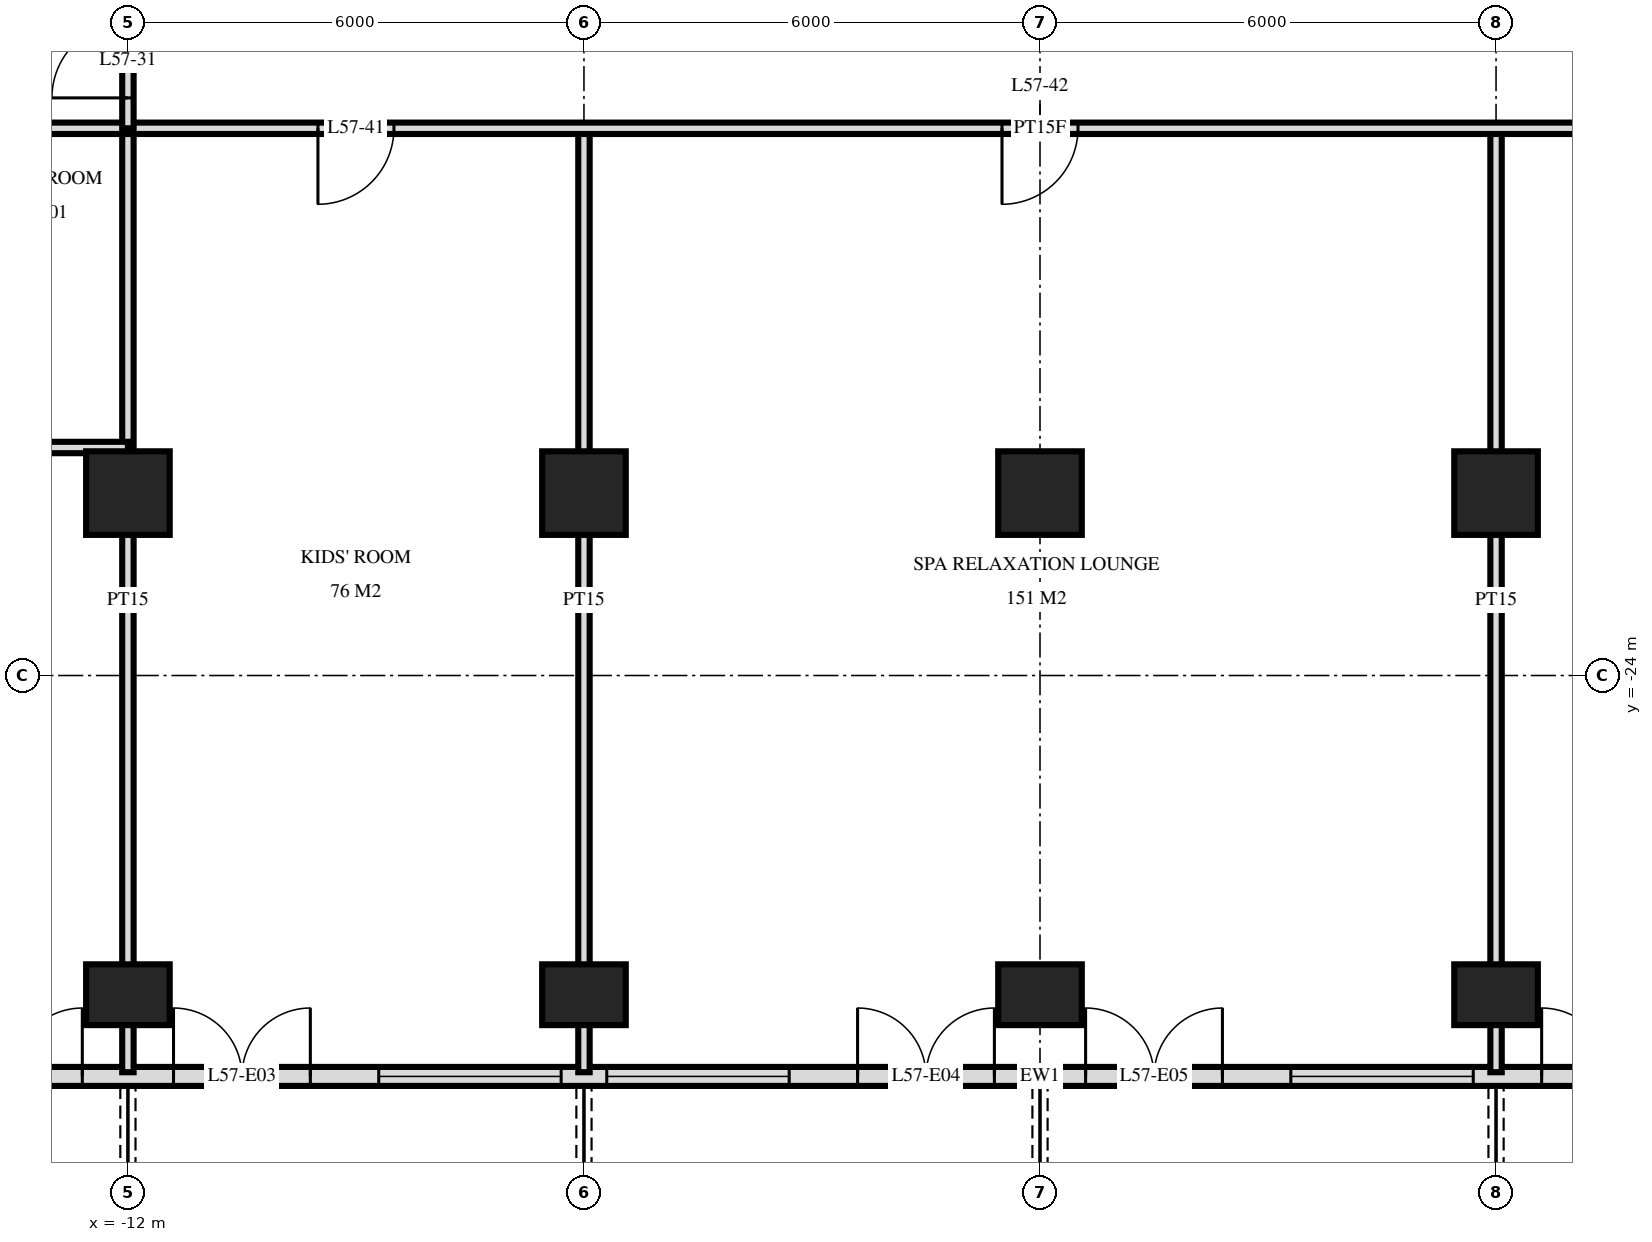
"""IFC4 building model, lengths in metres.
Left out: names, types, materials, properties, quantities, classifications, styles, units other than length and angle.
Written with IfcOpenShell. Run it as: python <this file> out.ifc"""

import sys

from ifc_helpers import new_model, si_unit, direction, frame, frame_2d, origin, origin_2d, place, context, subcontext, project, spatial, rectangle, extrude, element, fill, save


model = new_model("IFC4")
c1 = context("Model", 3, precision=1e-05, world=origin(), true_north=direction((0.0, 1.0)))
c2 = subcontext(c1, "Body", "Model", "MODEL_VIEW")
j1 = project(units=[si_unit("LENGTHUNIT", "METRE"), si_unit("PLANEANGLEUNIT", "RADIAN")], contexts=[c1])
p1 = place(None, origin())
s1 = spatial("IfcSite", under=j1, at=p1, CompositionType="ELEMENT")
p2 = place(p1, origin())
s2 = spatial("IfcBuilding", under=s1, at=p2, CompositionType="ELEMENT")
p3 = place(p2, frame((0.0, 0.0, 218.6)))
s3 = spatial("IfcBuildingStorey", under=s2, at=p3, CompositionType="ELEMENT", Elevation=218.6)
p4 = place(p3, frame((-12.0, -28.2, 0.0), z_axis=(0.0, 0.0, 1.0), x_axis=(1.0, 0.0, 0.0)))
e1 = element("IfcColumn", 1, at=p4, inside=s3, PredefinedType="COLUMN", context=c2, shape_type="SweptSolid", body=[
    extrude(rectangle(XDim=1.1, YDim=0.8, at=origin_2d()), origin(), (0.0, 0.0, 1.0), 3.5),
])
p5 = place(p3, frame((-12.0, -21.6, 0.0), z_axis=(0.0, 0.0, 1.0), x_axis=(1.0, 0.0, 0.0)))
e2 = element("IfcColumn", 2, at=p5, inside=s3, PredefinedType="COLUMN", context=c2, shape_type="SweptSolid", body=[
    extrude(rectangle(XDim=1.1, YDim=1.1, at=origin_2d()), origin(), (0.0, 0.0, 1.0), 3.5),
])
p6 = place(p3, frame((-6.0, -28.2, 0.0), z_axis=(0.0, 0.0, 1.0), x_axis=(1.0, 0.0, 0.0)))
e3 = element("IfcColumn", 3, at=p6, inside=s3, PredefinedType="COLUMN", context=c2, shape_type="SweptSolid", body=[
    extrude(rectangle(XDim=1.1, YDim=0.8, at=origin_2d()), origin(), (0.0, 0.0, 1.0), 3.5),
])
p7 = place(p3, frame((-6.0, -21.6, 0.0), z_axis=(0.0, 0.0, 1.0), x_axis=(1.0, 0.0, 0.0)))
e4 = element("IfcColumn", 4, at=p7, inside=s3, PredefinedType="COLUMN", context=c2, shape_type="SweptSolid", body=[
    extrude(rectangle(XDim=1.1, YDim=1.1, at=origin_2d()), origin(), (0.0, 0.0, 1.0), 3.5),
])
p8 = place(p3, frame((0.0, -28.2, 0.0), z_axis=(0.0, 0.0, 1.0), x_axis=(1.0, 0.0, 0.0)))
e5 = element("IfcColumn", 5, at=p8, inside=s3, PredefinedType="COLUMN", context=c2, shape_type="SweptSolid", body=[
    extrude(rectangle(XDim=1.1, YDim=0.8, at=origin_2d()), origin(), (0.0, 0.0, 1.0), 3.5),
])
p9 = place(p3, frame((0.0, -21.6, 0.0), z_axis=(0.0, 0.0, 1.0), x_axis=(1.0, 0.0, 0.0)))
e6 = element("IfcColumn", 6, at=p9, inside=s3, PredefinedType="COLUMN", context=c2, shape_type="SweptSolid", body=[
    extrude(rectangle(XDim=1.1, YDim=1.1, at=origin_2d()), origin(), (0.0, 0.0, 1.0), 3.5),
])
p10 = place(p3, frame((6.0, -28.2, 0.0), z_axis=(0.0, 0.0, 1.0), x_axis=(1.0, 0.0, 0.0)))
e7 = element("IfcColumn", 7, at=p10, inside=s3, PredefinedType="COLUMN", context=c2, shape_type="SweptSolid", body=[
    extrude(rectangle(XDim=1.1, YDim=0.8, at=origin_2d()), origin(), (0.0, 0.0, 1.0), 3.5),
])
p11 = place(p3, frame((6.0, -21.6, 0.0), z_axis=(0.0, 0.0, 1.0), x_axis=(1.0, 0.0, 0.0)))
e8 = element("IfcColumn", 8, at=p11, inside=s3, PredefinedType="COLUMN", context=c2, shape_type="SweptSolid", body=[
    extrude(rectangle(XDim=1.1, YDim=1.1, at=origin_2d()), origin(), (0.0, 0.0, 1.0), 3.5),
])
p12 = place(p3, frame((-22.475, -29.275, 0.0), z_axis=(0.0, 0.0, 1.0), x_axis=(1.0, 0.0, 0.0)))
e9 = element("IfcWall", 9, at=p12, inside=s3, PredefinedType="SOLIDWALL", context=c2, shape_type="SweptSolid", body=[
    extrude(rectangle(XDim=44.951, YDim=0.25, at=frame_2d((22.475, 0.0))), origin(), (0.0, 0.0, 1.0), 3.22),
])
p13 = place(p12, frame((0.575, 0.0, 0.0)))
e10 = element("IfcOpeningElement", 10, at=p13, cuts=e9, PredefinedType="OPENING", context=c2, shape_type="SweptSolid", body=[
    extrude(rectangle(XDim=1.8, YDim=2.4, at=frame_2d((0.9, 1.2))), frame((0.0, 0.135, 0.0), z_axis=(0.0, -1.0, 0.0), x_axis=(1.0, 0.0, 0.0)), (0.0, 0.0, 1.0), 0.27),
])
p14 = place(p12, frame((4.775, 0.0, 0.9)))
e11 = element("IfcOpeningElement", 11, at=p14, cuts=e9, PredefinedType="OPENING", context=c2, shape_type="SweptSolid", body=[
    extrude(rectangle(XDim=2.4, YDim=1.5, at=frame_2d((1.2, 0.75))), frame((0.0, 0.135, 0.0), z_axis=(0.0, -1.0, 0.0), x_axis=(1.0, 0.0, 0.0)), (0.0, 0.0, 1.0), 0.27),
])
p15 = place(p12, frame((8.075, 0.0, 0.0)))
e12 = element("IfcOpeningElement", 12, at=p15, cuts=e9, PredefinedType="OPENING", context=c2, shape_type="SweptSolid", body=[
    extrude(rectangle(XDim=1.8, YDim=2.4, at=frame_2d((0.9, 1.2))), frame((0.0, 0.135, 0.0), z_axis=(0.0, -1.0, 0.0), x_axis=(1.0, 0.0, 0.0)), (0.0, 0.0, 1.0), 0.27),
])
p16 = place(p12, frame((11.075, 0.0, 0.0)))
e13 = element("IfcOpeningElement", 13, at=p16, cuts=e9, PredefinedType="OPENING", context=c2, shape_type="SweptSolid", body=[
    extrude(rectangle(XDim=1.8, YDim=2.4, at=frame_2d((0.9, 1.2))), frame((0.0, 0.135, 0.0), z_axis=(0.0, -1.0, 0.0), x_axis=(1.0, 0.0, 0.0)), (0.0, 0.0, 1.0), 0.27),
])
p17 = place(p12, frame((13.775, 0.0, 0.9)))
e14 = element("IfcOpeningElement", 14, at=p17, cuts=e9, PredefinedType="OPENING", context=c2, shape_type="SweptSolid", body=[
    extrude(rectangle(XDim=2.4, YDim=1.5, at=frame_2d((1.2, 0.75))), frame((0.0, 0.135, 0.0), z_axis=(0.0, -1.0, 0.0), x_axis=(1.0, 0.0, 0.0)), (0.0, 0.0, 1.0), 0.27),
])
p18 = place(p12, frame((16.775, 0.0, 0.9)))
e15 = element("IfcOpeningElement", 15, at=p18, cuts=e9, PredefinedType="OPENING", context=c2, shape_type="SweptSolid", body=[
    extrude(rectangle(XDim=2.4, YDim=1.5, at=frame_2d((1.2, 0.75))), frame((0.0, 0.135, 0.0), z_axis=(0.0, -1.0, 0.0), x_axis=(1.0, 0.0, 0.0)), (0.0, 0.0, 1.0), 0.27),
])
p19 = place(p12, frame((20.075, 0.0, 0.0)))
e16 = element("IfcOpeningElement", 16, at=p19, cuts=e9, PredefinedType="OPENING", context=c2, shape_type="SweptSolid", body=[
    extrude(rectangle(XDim=1.8, YDim=2.4, at=frame_2d((0.9, 1.2))), frame((0.0, 0.135, 0.0), z_axis=(0.0, -1.0, 0.0), x_axis=(1.0, 0.0, 0.0)), (0.0, 0.0, 1.0), 0.27),
])
p20 = place(p12, frame((23.075, 0.0, 0.0)))
e17 = element("IfcOpeningElement", 17, at=p20, cuts=e9, PredefinedType="OPENING", context=c2, shape_type="SweptSolid", body=[
    extrude(rectangle(XDim=1.8, YDim=2.4, at=frame_2d((0.9, 1.2))), frame((0.0, 0.135, 0.0), z_axis=(0.0, -1.0, 0.0), x_axis=(1.0, 0.0, 0.0)), (0.0, 0.0, 1.0), 0.27),
])
p21 = place(p12, frame((25.775, 0.0, 0.9)))
e18 = element("IfcOpeningElement", 18, at=p21, cuts=e9, PredefinedType="OPENING", context=c2, shape_type="SweptSolid", body=[
    extrude(rectangle(XDim=2.4, YDim=1.5, at=frame_2d((1.2, 0.75))), frame((0.0, 0.135, 0.0), z_axis=(0.0, -1.0, 0.0), x_axis=(1.0, 0.0, 0.0)), (0.0, 0.0, 1.0), 0.27),
])
p22 = place(p12, frame((29.075, 0.0, 0.0)))
e19 = element("IfcOpeningElement", 19, at=p22, cuts=e9, PredefinedType="OPENING", context=c2, shape_type="SweptSolid", body=[
    extrude(rectangle(XDim=1.8, YDim=2.4, at=frame_2d((0.9, 1.2))), frame((0.0, 0.135, 0.0), z_axis=(0.0, -1.0, 0.0), x_axis=(1.0, 0.0, 0.0)), (0.0, 0.0, 1.0), 0.27),
])
p23 = place(p12, frame((31.775, 0.0, 0.9)))
e20 = element("IfcOpeningElement", 20, at=p23, cuts=e9, PredefinedType="OPENING", context=c2, shape_type="SweptSolid", body=[
    extrude(rectangle(XDim=2.4, YDim=1.5, at=frame_2d((1.2, 0.75))), frame((0.0, 0.135, 0.0), z_axis=(0.0, -1.0, 0.0), x_axis=(1.0, 0.0, 0.0)), (0.0, 0.0, 1.0), 0.27),
])
p24 = place(p12, frame((35.075, 0.0, 0.0)))
e21 = element("IfcOpeningElement", 21, at=p24, cuts=e9, PredefinedType="OPENING", context=c2, shape_type="SweptSolid", body=[
    extrude(rectangle(XDim=1.8, YDim=2.4, at=frame_2d((0.9, 1.2))), frame((0.0, 0.135, 0.0), z_axis=(0.0, -1.0, 0.0), x_axis=(1.0, 0.0, 0.0)), (0.0, 0.0, 1.0), 0.27),
])
p25 = place(p12, frame((41.075, 0.0, 0.0)))
e22 = element("IfcOpeningElement", 22, at=p25, cuts=e9, PredefinedType="OPENING", context=c2, shape_type="SweptSolid", body=[
    extrude(rectangle(XDim=1.8, YDim=2.4, at=frame_2d((0.9, 1.2))), frame((0.0, 0.135, 0.0), z_axis=(0.0, -1.0, 0.0), x_axis=(1.0, 0.0, 0.0)), (0.0, 0.0, 1.0), 0.27),
])
for number, where, z_axis, x_axis in (
    (23, (6.0, -29.22, 0.0), (0.0, 0.0, 1.0), (0.0, 1.0, 0.0)),
    (24, (-6.0, -29.22, 0.0), (0.0, 0.0, 1.0), (0.0, 1.0, 0.0)),
):
    element("IfcWall", number, at=place(p3, frame(where, z_axis=z_axis, x_axis=x_axis)), inside=s3, PredefinedType="PARTITIONING", context=c2, shape_type="SweptSolid", body=[
        extrude(rectangle(XDim=12.42, YDim=0.15, at=frame_2d((6.21, 0.0))), origin(), (0.0, 0.0, 1.0), 3.22),
    ])
p26 = place(p3, frame((-12.0, -16.8, 0.0), z_axis=(0.0, 0.0, 1.0), x_axis=(0.0, 1.0, 0.0)))
e25 = element("IfcWall", 25, at=p26, inside=s3, PredefinedType="PARTITIONING", context=c2, shape_type="SweptSolid", body=[
    extrude(rectangle(XDim=1.75, YDim=0.15, at=frame_2d((0.875, 0.0))), origin(), (0.0, 0.0, 1.0), 3.22),
])
p27 = place(p26, frame((0.4, 0.0, 0.0)))
e26 = element("IfcOpeningElement", 26, at=p27, cuts=e25, PredefinedType="OPENING", context=c2, shape_type="SweptSolid", body=[
    extrude(rectangle(XDim=1.0, YDim=2.1, at=frame_2d((0.5, 1.05))), frame((0.0, 0.085, 0.0), z_axis=(0.0, -1.0, 0.0), x_axis=(1.0, 0.0, 0.0)), (0.0, 0.0, 1.0), 0.17),
])
p28 = place(p3, frame((-12.0, -29.22, 0.0), z_axis=(0.0, 0.0, 1.0), x_axis=(0.0, 1.0, 0.0)))
e27 = element("IfcWall", 27, at=p28, inside=s3, PredefinedType="PARTITIONING", context=c2, shape_type="SweptSolid", body=[
    extrude(rectangle(XDim=12.42, YDim=0.15, at=frame_2d((6.21, 0.0))), origin(), (0.0, 0.0, 1.0), 3.22),
])
p29 = place(p3, frame((-14.4, -21.0, 0.0), z_axis=(0.0, 0.0, 1.0), x_axis=(1.0, 0.0, 0.0)))
e28 = element("IfcWall", 28, at=p29, inside=s3, PredefinedType="PARTITIONING", context=c2, shape_type="SweptSolid", body=[
    extrude(rectangle(XDim=2.4, YDim=0.15, at=frame_2d((1.2, 0.0))), origin(), (0.0, 0.0, 1.0), 3.22),
])
p30 = place(p3, frame((-26.82, -16.8, 0.0), z_axis=(0.0, 0.0, 1.0), x_axis=(1.0, 0.0, 0.0)))
e29 = element("IfcWall", 29, at=p30, inside=s3, PredefinedType="PARTITIONING", context=c2, shape_type="SweptSolid", body=[
    extrude(rectangle(XDim=53.64, YDim=0.15, at=frame_2d((26.82, 0.0))), origin(), (0.0, 0.0, 1.0), 3.22),
])
p31 = place(p30, frame((11.17, 0.0, 0.0)))
e30 = element("IfcOpeningElement", 30, at=p31, cuts=e29, PredefinedType="OPENING", context=c2, shape_type="SweptSolid", body=[
    extrude(rectangle(XDim=1.0, YDim=2.1, at=frame_2d((0.5, 1.05))), frame((0.0, 0.085, 0.0), z_axis=(0.0, -1.0, 0.0), x_axis=(1.0, 0.0, 0.0)), (0.0, 0.0, 1.0), 0.17),
])
p32 = place(p30, frame((3.22, 0.0, 0.0)))
e31 = element("IfcOpeningElement", 31, at=p32, cuts=e29, PredefinedType="OPENING", context=c2, shape_type="SweptSolid", body=[
    extrude(rectangle(XDim=1.0, YDim=2.1, at=frame_2d((0.5, 1.05))), frame((0.0, 0.085, 0.0), z_axis=(0.0, -1.0, 0.0), x_axis=(1.0, 0.0, 0.0)), (0.0, 0.0, 1.0), 0.17),
])
p33 = place(p30, frame((5.02, 0.0, 0.0)))
e32 = element("IfcOpeningElement", 32, at=p33, cuts=e29, PredefinedType="OPENING", context=c2, shape_type="SweptSolid", body=[
    extrude(rectangle(XDim=1.0, YDim=2.1, at=frame_2d((0.5, 1.05))), frame((0.0, 0.085, 0.0), z_axis=(0.0, -1.0, 0.0), x_axis=(1.0, 0.0, 0.0)), (0.0, 0.0, 1.0), 0.17),
])
p34 = place(p30, frame((47.72, 0.0, 0.0)))
e33 = element("IfcOpeningElement", 33, at=p34, cuts=e29, PredefinedType="OPENING", context=c2, shape_type="SweptSolid", body=[
    extrude(rectangle(XDim=1.0, YDim=2.1, at=frame_2d((0.5, 1.05))), frame((0.0, 0.085, 0.0), z_axis=(0.0, -1.0, 0.0), x_axis=(1.0, 0.0, 0.0)), (0.0, 0.0, 1.0), 0.17),
])
p35 = place(p30, frame((51.04, 0.0, 0.0)))
e34 = element("IfcOpeningElement", 34, at=p35, cuts=e29, PredefinedType="OPENING", context=c2, shape_type="SweptSolid", body=[
    extrude(rectangle(XDim=1.0, YDim=2.1, at=frame_2d((0.5, 1.05))), frame((0.0, 0.085, 0.0), z_axis=(0.0, -1.0, 0.0), x_axis=(1.0, 0.0, 0.0)), (0.0, 0.0, 1.0), 0.17),
])
p36 = place(p30, frame((17.32, 0.0, 0.0)))
e35 = element("IfcOpeningElement", 35, at=p36, cuts=e29, PredefinedType="OPENING", context=c2, shape_type="SweptSolid", body=[
    extrude(rectangle(XDim=1.0, YDim=2.1, at=frame_2d((0.5, 1.05))), frame((0.0, 0.085, 0.0), z_axis=(0.0, -1.0, 0.0), x_axis=(1.0, 0.0, 0.0)), (0.0, 0.0, 1.0), 0.17),
])
p37 = place(p30, frame((26.32, 0.0, 0.0)))
e36 = element("IfcOpeningElement", 36, at=p37, cuts=e29, PredefinedType="OPENING", context=c2, shape_type="SweptSolid", body=[
    extrude(rectangle(XDim=1.0, YDim=2.1, at=frame_2d((0.5, 1.05))), frame((0.0, 0.085, 0.0), z_axis=(0.0, -1.0, 0.0), x_axis=(1.0, 0.0, 0.0)), (0.0, 0.0, 1.0), 0.17),
])
p38 = place(p30, frame((35.32, 0.0, 0.0)))
e37 = element("IfcOpeningElement", 37, at=p38, cuts=e29, PredefinedType="OPENING", context=c2, shape_type="SweptSolid", body=[
    extrude(rectangle(XDim=1.0, YDim=2.1, at=frame_2d((0.5, 1.05))), frame((0.0, 0.085, 0.0), z_axis=(0.0, -1.0, 0.0), x_axis=(1.0, 0.0, 0.0)), (0.0, 0.0, 1.0), 0.17),
])
p39 = place(p15, origin())
e38 = element("IfcDoor", 38, at=p39, inside=s3, OperationType="DOUBLE_DOOR_SINGLE_SWING", PredefinedType="DOOR", context=c2, shape_type="SweptSolid", body=[
    extrude(rectangle(XDim=1.8, YDim=2.4, at=frame_2d((0.9, 1.2))), frame((0.0, 0.025, 0.0), z_axis=(0.0, -1.0, 0.0), x_axis=(1.0, 0.0, 0.0)), (0.0, 0.0, 1.0), 0.05),
])
fill(e12, e38)
p40 = place(p16, origin())
e39 = element("IfcDoor", 39, at=p40, inside=s3, OperationType="DOUBLE_DOOR_SINGLE_SWING", PredefinedType="DOOR", context=c2, shape_type="SweptSolid", body=[
    extrude(rectangle(XDim=1.8, YDim=2.4, at=frame_2d((0.9, 1.2))), frame((0.0, 0.025, 0.0), z_axis=(0.0, -1.0, 0.0), x_axis=(1.0, 0.0, 0.0)), (0.0, 0.0, 1.0), 0.05),
])
fill(e13, e39)
p41 = place(p17, origin())
e40 = element("IfcWindow", 40, at=p41, inside=s3, PartitioningType="SINGLE_PANEL", PredefinedType="WINDOW", context=c2, shape_type="SweptSolid", body=[
    extrude(rectangle(XDim=2.4, YDim=1.5, at=frame_2d((1.2, 0.75))), frame((0.0, 0.03, 0.0), z_axis=(0.0, -1.0, 0.0), x_axis=(1.0, 0.0, 0.0)), (0.0, 0.0, 1.0), 0.06),
])
fill(e14, e40)
p42 = place(p18, origin())
e41 = element("IfcWindow", 41, at=p42, inside=s3, PartitioningType="SINGLE_PANEL", PredefinedType="WINDOW", context=c2, shape_type="SweptSolid", body=[
    extrude(rectangle(XDim=2.4, YDim=1.5, at=frame_2d((1.2, 0.75))), frame((0.0, 0.03, 0.0), z_axis=(0.0, -1.0, 0.0), x_axis=(1.0, 0.0, 0.0)), (0.0, 0.0, 1.0), 0.06),
])
fill(e15, e41)
p43 = place(p19, origin())
e42 = element("IfcDoor", 42, at=p43, inside=s3, OperationType="DOUBLE_DOOR_SINGLE_SWING", PredefinedType="DOOR", context=c2, shape_type="SweptSolid", body=[
    extrude(rectangle(XDim=1.8, YDim=2.4, at=frame_2d((0.9, 1.2))), frame((0.0, 0.025, 0.0), z_axis=(0.0, -1.0, 0.0), x_axis=(1.0, 0.0, 0.0)), (0.0, 0.0, 1.0), 0.05),
])
fill(e16, e42)
p44 = place(p20, origin())
e43 = element("IfcDoor", 43, at=p44, inside=s3, OperationType="DOUBLE_DOOR_SINGLE_SWING", PredefinedType="DOOR", context=c2, shape_type="SweptSolid", body=[
    extrude(rectangle(XDim=1.8, YDim=2.4, at=frame_2d((0.9, 1.2))), frame((0.0, 0.025, 0.0), z_axis=(0.0, -1.0, 0.0), x_axis=(1.0, 0.0, 0.0)), (0.0, 0.0, 1.0), 0.05),
])
fill(e17, e43)
p45 = place(p21, origin())
e44 = element("IfcWindow", 44, at=p45, inside=s3, PartitioningType="SINGLE_PANEL", PredefinedType="WINDOW", context=c2, shape_type="SweptSolid", body=[
    extrude(rectangle(XDim=2.4, YDim=1.5, at=frame_2d((1.2, 0.75))), frame((0.0, 0.03, 0.0), z_axis=(0.0, -1.0, 0.0), x_axis=(1.0, 0.0, 0.0)), (0.0, 0.0, 1.0), 0.06),
])
fill(e18, e44)
p46 = place(p22, origin())
e45 = element("IfcDoor", 45, at=p46, inside=s3, OperationType="DOUBLE_DOOR_SINGLE_SWING", PredefinedType="DOOR", context=c2, shape_type="SweptSolid", body=[
    extrude(rectangle(XDim=1.8, YDim=2.4, at=frame_2d((0.9, 1.2))), frame((0.0, 0.025, 0.0), z_axis=(0.0, -1.0, 0.0), x_axis=(1.0, 0.0, 0.0)), (0.0, 0.0, 1.0), 0.05),
])
fill(e19, e45)
p47 = place(p27, origin())
e46 = element("IfcDoor", 46, at=p47, inside=s3, OperationType="SINGLE_SWING_RIGHT", PredefinedType="DOOR", context=c2, shape_type="SweptSolid", body=[
    extrude(rectangle(XDim=1.0, YDim=2.1, at=frame_2d((0.5, 1.05))), frame((0.0, 0.025, 0.0), z_axis=(0.0, -1.0, 0.0), x_axis=(1.0, 0.0, 0.0)), (0.0, 0.0, 1.0), 0.05),
])
fill(e26, e46)
p48 = place(p36, frame((0.5, 0.0, 0.0), z_axis=(0.0, 0.0, 1.0), x_axis=(-1.0, 0.0, 0.0)))
e47 = element("IfcDoor", 47, at=p48, inside=s3, OperationType="SINGLE_SWING_LEFT", PredefinedType="DOOR", context=c2, shape_type="SweptSolid", body=[
    extrude(rectangle(XDim=1.0, YDim=2.1, at=frame_2d((0.0, 1.05))), frame((0.0, -0.025, 0.0), z_axis=(0.0, 1.0, 0.0), x_axis=(-1.0, 0.0, 0.0)), (0.0, 0.0, 1.0), 0.05),
])
fill(e35, e47)
p49 = place(p37, frame((0.5, 0.0, 0.0), z_axis=(0.0, 0.0, 1.0), x_axis=(-1.0, 0.0, 0.0)))
e48 = element("IfcDoor", 48, at=p49, inside=s3, OperationType="SINGLE_SWING_LEFT", PredefinedType="DOOR", context=c2, shape_type="SweptSolid", body=[
    extrude(rectangle(XDim=1.0, YDim=2.1, at=frame_2d((0.0, 1.05))), frame((0.0, -0.025, 0.0), z_axis=(0.0, 1.0, 0.0), x_axis=(-1.0, 0.0, 0.0)), (0.0, 0.0, 1.0), 0.05),
])
fill(e36, e48)
save(model, sys.argv[1])
